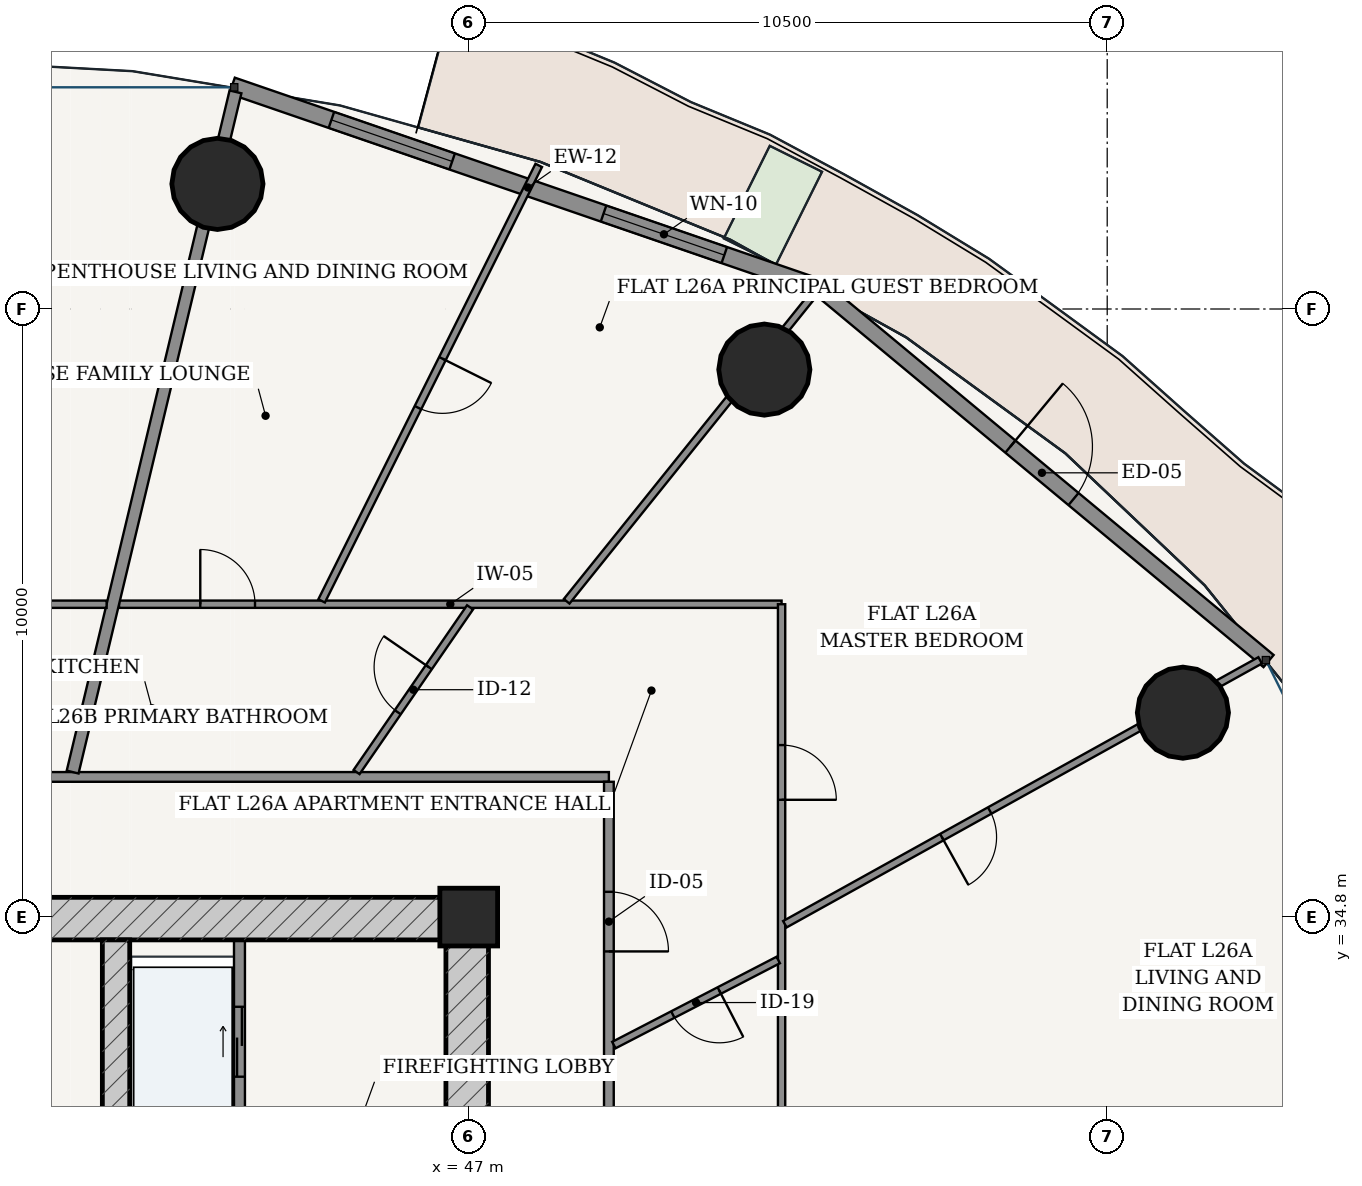
"""IFC4 building model, lengths in metres.
Left out: names, types, materials, properties, quantities, classifications, styles, units other than length and angle.
Written with IfcOpenShell. Run it as: python <this file> out.ifc"""

import sys

from ifc_helpers import new_model, si_unit, direction, frame, frame_2d, origin, origin_2d, place, context, subcontext, project, spatial, rectangle, hollow_circle, extrude, source, transform, mapped, element, fill, save


model = new_model("IFC4")
c1 = context("Model", 3, precision=1e-05, world=origin(), true_north=direction((-0.2419218956, 0.970295726276)))
c2 = subcontext(c1, "Body", "Model", "MODEL_VIEW")
j1 = project(units=[si_unit("LENGTHUNIT", "METRE"), si_unit("PLANEANGLEUNIT", "RADIAN")], contexts=[c1])
p1 = place(None, origin())
s1 = spatial("IfcSite", under=j1, at=p1, CompositionType="ELEMENT")
p2 = place(p1, origin())
s2 = spatial("IfcBuilding", under=s1, at=p2, CompositionType="ELEMENT")
p3 = place(p2, frame((0.0, 0.0, 101.4)))
s3 = spatial("IfcBuildingStorey", under=s2, at=p3, CompositionType="ELEMENT", Elevation=101.4)
p4 = place(p3, frame((47.0, 34.8, 0.0), z_axis=(0.0, 0.0, 1.0), x_axis=(1.0, 0.0, 0.0)))
e1 = element("IfcColumn", 1, at=p4, inside=s3, PredefinedType="COLUMN", context=c2, shape_type="SweptSolid", body=[
    extrude(rectangle(XDim=0.95, YDim=0.95, at=origin_2d()), origin(), (0.0, 0.0, 1.0), 3.6),
])
p5 = place(p3, frame((28.675, 34.775, 0.0), z_axis=(0.0, 0.0, 1.0), x_axis=(1.0, 0.0, 0.0)))
e2 = element("IfcWall", 2, at=p5, inside=s3, PredefinedType="SHEAR", context=c2, shape_type="SweptSolid", body=[
    extrude(rectangle(XDim=18.65, YDim=0.7, at=frame_2d((9.325, 0.0))), origin(), (0.0, 0.0, 1.0), 3.325),
])
p6 = place(p5, frame((7.357, 0.0, 0.0)))
e3 = element("IfcOpeningElement", 3, at=p6, cuts=e2, PredefinedType="OPENING", context=c2, shape_type="SweptSolid", body=[
    extrude(rectangle(XDim=0.86, YDim=2.1, at=frame_2d((0.43, 1.05))), frame((0.0, 0.36, 0.0), z_axis=(0.0, -1.0, 0.0), x_axis=(1.0, 0.0, 0.0)), (0.0, 0.0, 1.0), 0.72),
])
p7 = place(p5, frame((10.438, 0.0, 0.0)))
e4 = element("IfcOpeningElement", 4, at=p7, cuts=e2, PredefinedType="OPENING", context=c2, shape_type="SweptSolid", body=[
    extrude(rectangle(XDim=0.85, YDim=2.1, at=frame_2d((0.425, 1.05))), frame((0.0, 0.36, 0.0), z_axis=(0.0, -1.0, 0.0), x_axis=(1.0, 0.0, 0.0)), (0.0, 0.0, 1.0), 0.72),
])
p8 = place(p3, frame((46.975, 19.175, 0.0), z_axis=(0.0, 0.0, 1.0), x_axis=(0.0, 1.0, 0.0)))
e5 = element("IfcWall", 5, at=p8, inside=s3, PredefinedType="SHEAR", context=c2, shape_type="SweptSolid", body=[
    extrude(rectangle(XDim=15.25, YDim=0.7, at=frame_2d((7.625, 0.0))), origin(), (0.0, 0.0, 1.0), 3.325),
])
p9 = place(p8, frame((9.875, 0.0, 0.0)))
e6 = element("IfcOpeningElement", 6, at=p9, cuts=e5, PredefinedType="OPENING", context=c2, shape_type="SweptSolid", body=[
    extrude(rectangle(XDim=1.5, YDim=2.2, at=frame_2d((0.75, 1.1))), frame((0.0, 0.36, 0.0), z_axis=(0.0, -1.0, 0.0), x_axis=(1.0, 0.0, 0.0)), (0.0, 0.0, 1.0), 0.72),
])
p10 = place(p3, frame((41.2, 19.175, 0.0), z_axis=(0.0, 0.0, 1.0), x_axis=(0.0, 1.0, 0.0)))
e7 = element("IfcWall", 7, at=p10, inside=s3, PredefinedType="SHEAR", context=c2, shape_type="SweptSolid", body=[
    extrude(rectangle(XDim=15.25, YDim=0.45, at=frame_2d((7.625, 0.0))), origin(), (0.0, 0.0, 1.0), 3.325),
])
p11 = place(p10, frame((7.8, 0.0, 0.0)))
e8 = element("IfcOpeningElement", 8, at=p11, cuts=e7, PredefinedType="OPENING", context=c2, shape_type="SweptSolid", body=[
    extrude(rectangle(XDim=1.05, YDim=2.15, at=frame_2d((0.525, 1.075))), frame((0.0, 0.235, 0.0), z_axis=(0.0, -1.0, 0.0), x_axis=(1.0, 0.0, 0.0)), (0.0, 0.0, 1.0), 0.47),
])
for number, where, z_axis, x_axis in (
    (9, (58.745, 38.161, 0.0), (0.0, 0.0, 1.0), (1.0, 0.0, 0.0)),
    (10, (51.862, 43.803, 0.0), (0.0, 0.0, 1.0), (1.0, 0.0, 0.0)),
    (11, (42.867, 46.857, 0.0), (0.0, 0.0, 1.0), (1.0, 0.0, 0.0)),
):
    element("IfcColumn", number, at=place(p3, frame(where, z_axis=z_axis, x_axis=x_axis)), inside=s3, PredefinedType="COLUMN", context=c2, shape_type="SweptSolid", body=[
        extrude(hollow_circle(Radius=0.75, WallThickness=0.045, at=origin_2d()), origin(), (0.0, 0.0, 1.0), 3.6),
    ])
p12 = place(p3, frame((60.154, 39.01, 0.0), z_axis=(0.0, 0.0, 1.0), x_axis=(-0.769242574941, 0.638956853706, 0.0)))
e12 = element("IfcWall", 12, at=p12, inside=s3, PredefinedType="SOLIDWALL", context=c2, shape_type="SweptSolid", body=[
    extrude(rectangle(XDim=9.69, YDim=0.26, at=frame_2d((4.845, 0.0))), origin(), (0.0, 0.0, 1.0), 3.325),
])
p13 = place(p12, frame((4.17, 0.0, 0.0)))
e13 = element("IfcOpeningElement", 13, at=p13, cuts=e12, PredefinedType="OPENING", context=c2, shape_type="SweptSolid", body=[
    extrude(rectangle(XDim=1.35, YDim=2.2, at=frame_2d((0.675, 1.1))), frame((0.0, 0.14, 0.0), z_axis=(0.0, -1.0, 0.0), x_axis=(1.0, 0.0, 0.0)), (0.0, 0.0, 1.0), 0.28),
])
p14 = place(p3, frame((52.837, 45.125, 0.0), z_axis=(0.0, 0.0, 1.0), x_axis=(-0.945597432299, 0.325339047809, 0.0)))
e14 = element("IfcWall", 14, at=p14, inside=s3, PredefinedType="SOLIDWALL", context=c2, shape_type="SweptSolid", body=[
    extrude(rectangle(XDim=10.289, YDim=0.28, at=frame_2d((5.145, 0.0))), origin(), (0.0, 0.0, 1.0), 3.325),
])
p15 = place(p14, frame((1.728, 0.0, 0.85)))
e15 = element("IfcOpeningElement", 15, at=p15, cuts=e14, PredefinedType="OPENING", context=c2, shape_type="SweptSolid", body=[
    extrude(rectangle(XDim=2.1, YDim=1.95, at=frame_2d((1.05, 0.975))), frame((0.0, 0.15, 0.0), z_axis=(0.0, -1.0, 0.0), x_axis=(1.0, 0.0, 0.0)), (0.0, 0.0, 1.0), 0.3),
])
p16 = place(p14, frame((6.461, 0.0, 0.85)))
e16 = element("IfcOpeningElement", 16, at=p16, cuts=e14, PredefinedType="OPENING", context=c2, shape_type="SweptSolid", body=[
    extrude(rectangle(XDim=2.1, YDim=1.95, at=frame_2d((1.05, 0.975))), frame((0.0, 0.15, 0.0), z_axis=(0.0, -1.0, 0.0), x_axis=(1.0, 0.0, 0.0)), (0.0, 0.0, 1.0), 0.3),
])
p17 = place(p3, frame((43.23, 28.52, 0.0), z_axis=(0.0, 0.0, 1.0), x_axis=(0.0, 1.0, 0.0)))
e17 = element("IfcWall", 17, at=p17, inside=s3, PredefinedType="PARTITIONING", context=c2, shape_type="SweptSolid", body=[
    extrude(rectangle(XDim=5.905, YDim=0.18, at=frame_2d((2.953, 0.0))), origin(), (0.0, 0.0, 1.0), 3.325),
])
p18 = place(p17, frame((0.905, 0.0, 0.0)))
e18 = element("IfcOpeningElement", 18, at=p18, cuts=e17, PredefinedType="OPENING", context=c2, shape_type="SweptSolid", body=[
    extrude(rectangle(XDim=0.85, YDim=2.1, at=frame_2d((0.425, 1.05))), frame((0.0, 0.1, 0.0), z_axis=(0.0, -1.0, 0.0), x_axis=(1.0, 0.0, 0.0)), (0.0, 0.0, 1.0), 0.2),
])
p19 = place(p17, frame((3.655, 0.0, 0.0)))
e19 = element("IfcOpeningElement", 19, at=p19, cuts=e17, PredefinedType="OPENING", context=c2, shape_type="SweptSolid", body=[
    extrude(rectangle(XDim=1.15, YDim=2.2, at=frame_2d((0.575, 1.1))), frame((0.0, 0.1, 0.0), z_axis=(0.0, -1.0, 0.0), x_axis=(1.0, 0.0, 0.0)), (0.0, 0.0, 1.0), 0.2),
])
p20 = place(p3, frame((26.695, 37.105, 0.0), z_axis=(0.0, 0.0, 1.0), x_axis=(1.0, 0.0, 0.0)))
e20 = element("IfcWall", 20, at=p20, inside=s3, PredefinedType="PARTITIONING", context=c2, shape_type="SweptSolid", body=[
    extrude(rectangle(XDim=22.61, YDim=0.16, at=frame_2d((11.305, 0.0))), origin(), (0.0, 0.0, 1.0), 2.767),
])
p21 = place(p20, frame((4.925, 0.0, 0.0)))
e21 = element("IfcOpeningElement", 21, at=p21, cuts=e20, PredefinedType="OPENING", context=c2, shape_type="SweptSolid", body=[
    extrude(rectangle(XDim=0.98, YDim=2.2, at=frame_2d((0.49, 1.1))), frame((0.0, 0.09, 0.0), z_axis=(0.0, -1.0, 0.0), x_axis=(1.0, 0.0, 0.0)), (0.0, 0.0, 1.0), 0.18),
])
p22 = place(p3, frame((49.305, 16.575, 0.0), z_axis=(0.0, 0.0, 1.0), x_axis=(0.0, 1.0, 0.0)))
e22 = element("IfcWall", 22, at=p22, inside=s3, PredefinedType="PARTITIONING", context=c2, shape_type="SweptSolid", body=[
    extrude(rectangle(XDim=20.45, YDim=0.16, at=frame_2d((10.225, 0.0))), origin(), (0.0, 0.0, 1.0), 2.767),
])
p23 = place(p22, frame((17.66, 0.0, 0.0)))
e23 = element("IfcOpeningElement", 23, at=p23, cuts=e22, PredefinedType="OPENING", context=c2, shape_type="SweptSolid", body=[
    extrude(rectangle(XDim=0.98, YDim=2.2, at=frame_2d((0.49, 1.1))), frame((0.0, 0.09, 0.0), z_axis=(0.0, -1.0, 0.0), x_axis=(1.0, 0.0, 0.0)), (0.0, 0.0, 1.0), 0.18),
])
p24 = place(p3, frame((41.249, 39.945, 0.0), z_axis=(0.0, 0.0, 1.0), x_axis=(1.0, 0.0, 0.0)))
e24 = element("IfcWall", 24, at=p24, inside=s3, PredefinedType="PARTITIONING", context=c2, shape_type="SweptSolid", body=[
    extrude(rectangle(XDim=10.896, YDim=0.12, at=frame_2d((5.448, 0.0))), origin(), (0.0, 0.0, 1.0), 2.767),
])
p25 = place(p24, frame((1.336, 0.0, 0.0)))
e25 = element("IfcOpeningElement", 25, at=p25, cuts=e24, PredefinedType="OPENING", context=c2, shape_type="SweptSolid", body=[
    extrude(rectangle(XDim=0.9, YDim=2.15, at=frame_2d((0.45, 1.075))), frame((0.0, 0.07, 0.0), z_axis=(0.0, -1.0, 0.0), x_axis=(1.0, 0.0, 0.0)), (0.0, 0.0, 1.0), 0.14),
])
p26 = place(p3, frame((52.145, 39.945, 0.0), z_axis=(0.0, 0.0, 1.0), x_axis=(0.0, -1.0, 0.0)))
e26 = element("IfcWall", 26, at=p26, inside=s3, PredefinedType="PARTITIONING", context=c2, shape_type="SweptSolid", body=[
    extrude(rectangle(XDim=10.705, YDim=0.12, at=frame_2d((5.353, 0.0))), origin(), (0.0, 0.0, 1.0), 2.767),
])
p27 = place(p26, frame((2.316, 0.0, 0.0)))
e27 = element("IfcOpeningElement", 27, at=p27, cuts=e26, PredefinedType="OPENING", context=c2, shape_type="SweptSolid", body=[
    extrude(rectangle(XDim=0.9, YDim=2.15, at=frame_2d((0.45, 1.075))), frame((0.0, 0.07, 0.0), z_axis=(0.0, -1.0, 0.0), x_axis=(1.0, 0.0, 0.0)), (0.0, 0.0, 1.0), 0.14),
])
p28 = place(p3, frame((52.199, 34.683, 0.0), z_axis=(0.0, 0.0, 1.0), x_axis=(0.874320827228, 0.485348422349, 0.0)))
e28 = element("IfcWall", 28, at=p28, inside=s3, PredefinedType="PARTITIONING", context=c2, shape_type="SweptSolid", body=[
    extrude(rectangle(XDim=8.94, YDim=0.12, at=frame_2d((4.47, 0.0))), origin(), (0.0, 0.0, 1.0), 2.767),
])
p29 = place(p28, frame((2.953, 0.0, 0.0)))
e29 = element("IfcOpeningElement", 29, at=p29, cuts=e28, PredefinedType="OPENING", context=c2, shape_type="SweptSolid", body=[
    extrude(rectangle(XDim=0.9, YDim=2.15, at=frame_2d((0.45, 1.075))), frame((0.0, 0.07, 0.0), z_axis=(0.0, -1.0, 0.0), x_axis=(1.0, 0.0, 0.0)), (0.0, 0.0, 1.0), 0.14),
])
p30 = place(p3, frame((48.611, 39.993, 0.0), z_axis=(0.0, 0.0, 1.0), x_axis=(0.626719700294, 0.779244773651, 0.0)))
e30 = element("IfcWall", 30, at=p30, inside=s3, PredefinedType="PARTITIONING", context=c2, shape_type="SweptSolid", body=[
    extrude(rectangle(XDim=6.537, YDim=0.12, at=frame_2d((3.269, 0.0))), origin(), (0.0, 0.0, 1.0), 2.767),
])
p31 = place(p3, frame((44.581, 40.0, 0.0), z_axis=(0.0, 0.0, 1.0), x_axis=(0.446188142997, 0.894939182877, 0.0)))
e31 = element("IfcWall", 31, at=p31, inside=s3, PredefinedType="PARTITIONING", context=c2, shape_type="SweptSolid", body=[
    extrude(rectangle(XDim=8.002, YDim=0.12, at=frame_2d((4.001, 0.0))), origin(), (0.0, 0.0, 1.0), 2.767),
])
p32 = place(p31, frame((3.551, 0.0, 0.0)))
e32 = element("IfcOpeningElement", 32, at=p32, cuts=e31, PredefinedType="OPENING", context=c2, shape_type="SweptSolid", body=[
    extrude(rectangle(XDim=0.9, YDim=2.15, at=frame_2d((0.45, 1.075))), frame((0.0, 0.07, 0.0), z_axis=(0.0, -1.0, 0.0), x_axis=(1.0, 0.0, 0.0)), (0.0, 0.0, 1.0), 0.14),
])
p33 = place(p3, frame((49.387, 32.695, 0.0), z_axis=(0.0, 0.0, 1.0), x_axis=(0.888050549489, 0.459745822767, 0.0)))
e33 = element("IfcWall", 33, at=p33, inside=s3, PredefinedType="PARTITIONING", context=c2, shape_type="SweptSolid", body=[
    extrude(rectangle(XDim=3.044, YDim=0.12, at=frame_2d((1.522, 0.0))), origin(), (0.0, 0.0, 1.0), 3.325),
])
p34 = place(p33, frame((1.092, 0.0, 0.0)))
e34 = element("IfcOpeningElement", 34, at=p34, cuts=e33, PredefinedType="OPENING", context=c2, shape_type="SweptSolid", body=[
    extrude(rectangle(XDim=0.86, YDim=2.15, at=frame_2d((0.43, 1.075))), frame((0.0, 0.07, 0.0), z_axis=(0.0, -1.0, 0.0), x_axis=(1.0, 0.0, 0.0)), (0.0, 0.0, 1.0), 0.14),
])
p35 = place(p3, frame((45.155, 37.185, 0.0), z_axis=(0.0, 0.0, 1.0), x_axis=(0.567360037454, 0.823469846382, 0.0)))
e35 = element("IfcWall", 35, at=p35, inside=s3, PredefinedType="PARTITIONING", context=c2, shape_type="SweptSolid", body=[
    extrude(rectangle(XDim=3.29, YDim=0.12, at=frame_2d((1.645, 0.0))), origin(), (0.0, 0.0, 1.0), 3.004),
])
p36 = place(p35, frame((1.195, 0.0, 0.0)))
e36 = element("IfcOpeningElement", 36, at=p36, cuts=e35, PredefinedType="OPENING", context=c2, shape_type="SweptSolid", body=[
    extrude(rectangle(XDim=0.9, YDim=2.15, at=frame_2d((0.45, 1.075))), frame((0.0, 0.07, 0.0), z_axis=(0.0, -1.0, 0.0), x_axis=(1.0, 0.0, 0.0)), (0.0, 0.0, 1.0), 0.14),
])
p37 = place(p3, frame((40.486, 37.185, 0.0), z_axis=(0.0, 0.0, 1.0), x_axis=(0.232834224261, 0.972516438942, 0.0)))
e37 = element("IfcWall", 37, at=p37, inside=s3, PredefinedType="PARTITIONING", context=c2, shape_type="SweptSolid", body=[
    extrude(rectangle(XDim=11.502, YDim=0.2, at=frame_2d((5.751, 0.0))), origin(), (0.0, 0.0, 1.0), 2.767),
])
p38 = place(p3, frame((23.855, 39.945, 0.0), z_axis=(0.0, 0.0, 1.0), x_axis=(1.0, 0.0, 0.0)))
e38 = element("IfcWall", 38, at=p38, inside=s3, PredefinedType="PARTITIONING", context=c2, shape_type="SweptSolid", body=[
    extrude(rectangle(XDim=17.19, YDim=0.12, at=frame_2d((8.595, 0.0))), origin(), (0.0, 0.0, 1.0), 2.767),
])
p39 = place(p38, frame((9.133, 0.0, 0.0)))
e39 = element("IfcOpeningElement", 39, at=p39, cuts=e38, PredefinedType="OPENING", context=c2, shape_type="SweptSolid", body=[
    extrude(rectangle(XDim=0.9, YDim=2.15, at=frame_2d((0.45, 1.075))), frame((0.0, 0.07, 0.0), z_axis=(0.0, -1.0, 0.0), x_axis=(1.0, 0.0, 0.0)), (0.0, 0.0, 1.0), 0.14),
])
m1 = source(origin(), c2, "Body", "SweptSolid", [
    extrude(rectangle(XDim=1.35, YDim=2.2, at=frame_2d((0.675, 1.1))), frame((0.0, 0.025, 0.0), z_axis=(0.0, -1.0, 0.0), x_axis=(1.0, 0.0, 0.0)), (0.0, 0.0, 1.0), 0.05),
])
p40 = place(p13, frame((1.35, 0.0, 0.0), z_axis=(0.0, 0.0, 1.0), x_axis=(-1.0, 0.0, 0.0)))
e40 = element("IfcDoor", 40, at=p40, inside=s3, OperationType="SINGLE_SWING_LEFT", PredefinedType="DOOR", context=c2, shape_type="MappedRepresentation", body=[
    mapped(m1, transform((0.0, 0.0, 0.0), scale=1.0)),
])
fill(e13, e40)
m2 = source(origin(), c2, "Body", "SweptSolid", [
    extrude(rectangle(XDim=2.1, YDim=1.95, at=frame_2d((1.05, 0.975))), frame((0.0, 0.03, 0.0), z_axis=(0.0, -1.0, 0.0), x_axis=(1.0, 0.0, 0.0)), (0.0, 0.0, 1.0), 0.06),
])
p41 = place(p15, origin())
e41 = element("IfcWindow", 41, at=p41, inside=s3, PartitioningType="SINGLE_PANEL", PredefinedType="WINDOW", context=c2, shape_type="MappedRepresentation", body=[
    mapped(m2, transform((0.0, 0.0, 0.0), scale=1.0)),
])
fill(e15, e41)
p42 = place(p16, origin())
e42 = element("IfcWindow", 42, at=p42, inside=s3, PartitioningType="SINGLE_PANEL", PredefinedType="WINDOW", context=c2, shape_type="MappedRepresentation", body=[
    mapped(m2, transform((0.0, 0.0, 0.0), scale=1.0)),
])
fill(e16, e42)
m3 = source(origin(), c2, "Body", "SweptSolid", [
    extrude(rectangle(XDim=1.15, YDim=2.2, at=frame_2d((0.575, 1.1))), frame((0.0, 0.025, 0.0), z_axis=(0.0, -1.0, 0.0), x_axis=(1.0, 0.0, 0.0)), (0.0, 0.0, 1.0), 0.05),
])
p43 = place(p19, origin())
e43 = element("IfcDoor", 43, at=p43, inside=s3, OperationType="DOUBLE_DOOR_SLIDING", PredefinedType="DOOR", context=c2, shape_type="MappedRepresentation", body=[
    mapped(m3, transform((0.0, 0.0, 0.0), scale=1.0)),
])
fill(e19, e43)
m4 = source(origin(), c2, "Body", "SweptSolid", [
    extrude(rectangle(XDim=0.98, YDim=2.2, at=frame_2d((0.49, 1.1))), frame((0.0, 0.025, 0.0), z_axis=(0.0, -1.0, 0.0), x_axis=(1.0, 0.0, 0.0)), (0.0, 0.0, 1.0), 0.05),
])
p44 = place(p23, frame((0.98, 0.0, 0.0), z_axis=(0.0, 0.0, 1.0), x_axis=(-1.0, 0.0, 0.0)))
e44 = element("IfcDoor", 44, at=p44, inside=s3, OperationType="SINGLE_SWING_RIGHT", PredefinedType="DOOR", context=c2, shape_type="MappedRepresentation", body=[
    mapped(m4, transform((0.0, 0.0, 0.0), scale=1.0)),
])
fill(e23, e44)
m5 = source(origin(), c2, "Body", "SweptSolid", [
    extrude(rectangle(XDim=0.86, YDim=2.15, at=frame_2d((0.43, 1.075))), frame((0.0, 0.025, 0.0), z_axis=(0.0, -1.0, 0.0), x_axis=(1.0, 0.0, 0.0)), (0.0, 0.0, 1.0), 0.05),
])
p45 = place(p34, frame((0.86, 0.0, 0.0), z_axis=(0.0, 0.0, 1.0), x_axis=(-1.0, 0.0, 0.0)))
e45 = element("IfcDoor", 45, at=p45, inside=s3, OperationType="SINGLE_SWING_LEFT", PredefinedType="DOOR", context=c2, shape_type="MappedRepresentation", body=[
    mapped(m5, transform((0.0, 0.0, 0.0), scale=1.0)),
])
fill(e34, e45)
m6 = source(origin(), c2, "Body", "SweptSolid", [
    extrude(rectangle(XDim=0.9, YDim=2.15, at=frame_2d((0.45, 1.075))), frame((0.0, 0.025, 0.0), z_axis=(0.0, -1.0, 0.0), x_axis=(1.0, 0.0, 0.0)), (0.0, 0.0, 1.0), 0.05),
])
p46 = place(p36, origin())
e46 = element("IfcDoor", 46, at=p46, inside=s3, OperationType="SINGLE_SWING_RIGHT", PredefinedType="DOOR", context=c2, shape_type="MappedRepresentation", body=[
    mapped(m6, transform((0.0, 0.0, 0.0), scale=1.0)),
])
fill(e36, e46)
p47 = place(p25, origin())
e47 = element("IfcDoor", 47, at=p47, inside=s3, OperationType="SINGLE_SWING_LEFT", PredefinedType="DOOR", context=c2, shape_type="MappedRepresentation", body=[
    mapped(m6, transform((0.0, 0.0, 0.0), scale=1.0)),
])
fill(e25, e47)
p48 = place(p27, origin())
e48 = element("IfcDoor", 48, at=p48, inside=s3, OperationType="SINGLE_SWING_RIGHT", PredefinedType="DOOR", context=c2, shape_type="MappedRepresentation", body=[
    mapped(m6, transform((0.0, 0.0, 0.0), scale=1.0)),
])
fill(e27, e48)
p49 = place(p32, frame((0.9, 0.0, 0.0), z_axis=(0.0, 0.0, 1.0), x_axis=(-1.0, 0.0, 0.0)))
e49 = element("IfcDoor", 49, at=p49, inside=s3, OperationType="SINGLE_SWING_LEFT", PredefinedType="DOOR", context=c2, shape_type="MappedRepresentation", body=[
    mapped(m6, transform((0.0, 0.0, 0.0), scale=1.0)),
])
fill(e32, e49)
p50 = place(p29, frame((0.9, 0.0, 0.0), z_axis=(0.0, 0.0, 1.0), x_axis=(-1.0, 0.0, 0.0)))
e50 = element("IfcDoor", 50, at=p50, inside=s3, OperationType="SINGLE_SWING_RIGHT", PredefinedType="DOOR", context=c2, shape_type="MappedRepresentation", body=[
    mapped(m6, transform((0.0, 0.0, 0.0), scale=1.0)),
])
fill(e29, e50)
save(model, sys.argv[1])
